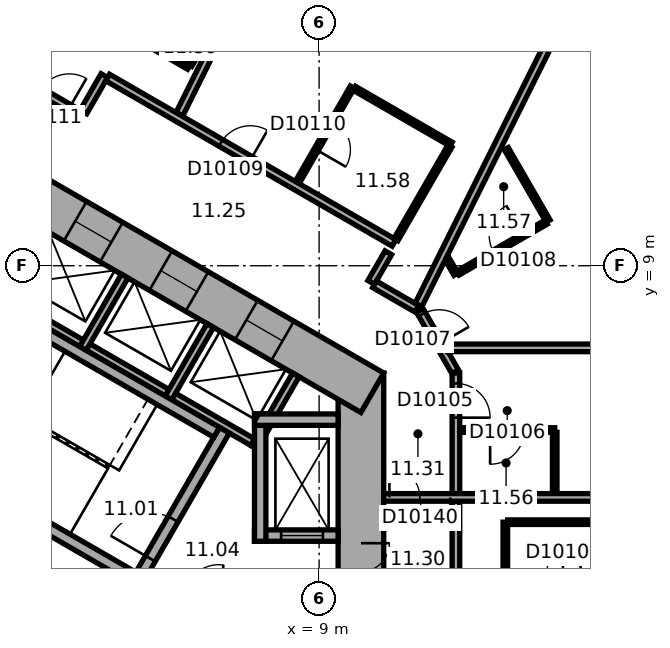
"""IFC4 building model, lengths in metres.
Left out: names, types, materials, properties, quantities, classifications, styles, units other than length and angle.
Written with IfcOpenShell. Run it as: python <this file> out.ifc"""

import sys

from ifc_helpers import new_model, si_unit, direction, frame, frame_2d, origin, place, context, subcontext, project, spatial, rectangle, extrude, element, fill, save


model = new_model("IFC4")
c1 = context("Model", 3, precision=1e-05, world=origin(), true_north=direction((0.0, 1.0)))
c2 = subcontext(c1, "Body", "Model", "MODEL_VIEW")
j1 = project(units=[si_unit("LENGTHUNIT", "METRE"), si_unit("PLANEANGLEUNIT", "RADIAN")], contexts=[c1])
p1 = place(None, origin())
s1 = spatial("IfcSite", under=j1, at=p1, CompositionType="ELEMENT")
p2 = place(p1, origin())
s2 = spatial("IfcBuilding", under=s1, at=p2, CompositionType="ELEMENT")
p3 = place(p2, frame((0.0, 0.0, 57.2)))
s3 = spatial("IfcBuildingStorey", under=s2, at=p3, CompositionType="ELEMENT", Elevation=57.2)
p4 = place(p3, frame((10.1, -6.177, 0.0), z_axis=(0.0, 0.0, 1.0), x_axis=(0.0, 1.0, 0.0)))
e1 = element("IfcWall", 1, at=p4, inside=s3, PredefinedType="SHEAR", context=c2, shape_type="SweptSolid", body=[
    extrude(rectangle(XDim=12.355, YDim=1.2, at=frame_2d((6.177, 0.0))), origin(), (0.0, 0.0, 1.0), 3.3),
])
p5 = place(p4, frame((6.378, 0.0, 0.0)))
e2 = element("IfcOpeningElement", 2, at=p5, cuts=e1, PredefinedType="OPENING", context=c2, shape_type="SweptSolid", body=[
    extrude(rectangle(XDim=1.5, YDim=2.1, at=frame_2d((0.75, 1.05))), frame((0.0, 0.61, 0.0), z_axis=(0.0, -1.0, 0.0), x_axis=(1.0, 0.0, 0.0)), (0.0, 0.0, 1.0), 1.22),
])
p6 = place(p4, frame((1.828, 0.0, 0.0)))
e3 = element("IfcOpeningElement", 3, at=p6, cuts=e1, PredefinedType="OPENING", context=c2, shape_type="SweptSolid", body=[
    extrude(rectangle(XDim=1.1, YDim=2.1, at=frame_2d((0.55, 1.05))), frame((0.0, 0.61, 0.0), z_axis=(0.0, -1.0, 0.0), x_axis=(1.0, 0.0, 0.0)), (0.0, 0.0, 1.0), 1.22),
])
p7 = place(p4, frame((4.427, 0.0, 0.0)))
e4 = element("IfcOpeningElement", 4, at=p7, cuts=e1, PredefinedType="OPENING", context=c2, shape_type="SweptSolid", body=[
    extrude(rectangle(XDim=1.1, YDim=2.1, at=frame_2d((0.55, 1.05))), frame((0.0, 0.61, 0.0), z_axis=(0.0, -1.0, 0.0), x_axis=(1.0, 0.0, 0.0)), (0.0, 0.0, 1.0), 1.22),
])
p8 = place(p3, frame((10.4, 5.658, 0.0), z_axis=(0.0, 0.0, 1.0), x_axis=(-0.866021384402, 0.500006961711, 0.0)))
e5 = element("IfcWall", 5, at=p8, inside=s3, PredefinedType="SHEAR", context=c2, shape_type="SweptSolid", body=[
    extrude(rectangle(XDim=12.355, YDim=1.2, at=frame_2d((6.178, 0.0))), origin(), (0.0, 0.0, 1.0), 3.3),
])
p9 = place(p8, frame((2.728, 0.0, 0.0)))
e6 = element("IfcOpeningElement", 6, at=p9, cuts=e5, PredefinedType="OPENING", context=c2, shape_type="SweptSolid", body=[
    extrude(rectangle(XDim=1.1, YDim=2.1, at=frame_2d((0.55, 1.05))), frame((0.0, 0.61, 0.0), z_axis=(0.0, -1.0, 0.0), x_axis=(1.0, 0.0, 0.0)), (0.0, 0.0, 1.0), 1.22),
])
p10 = place(p8, frame((5.328, 0.0, 0.0)))
e7 = element("IfcOpeningElement", 7, at=p10, cuts=e5, PredefinedType="OPENING", context=c2, shape_type="SweptSolid", body=[
    extrude(rectangle(XDim=1.1, YDim=2.1, at=frame_2d((0.55, 1.05))), frame((0.0, 0.61, 0.0), z_axis=(0.0, -1.0, 0.0), x_axis=(1.0, 0.0, 0.0)), (0.0, 0.0, 1.0), 1.22),
])
p11 = place(p8, frame((7.928, 0.0, 0.0)))
e8 = element("IfcOpeningElement", 8, at=p11, cuts=e5, PredefinedType="OPENING", context=c2, shape_type="SweptSolid", body=[
    extrude(rectangle(XDim=1.1, YDim=2.1, at=frame_2d((0.55, 1.05))), frame((0.0, 0.61, 0.0), z_axis=(0.0, -1.0, 0.0), x_axis=(1.0, 0.0, 0.0)), (0.0, 0.0, 1.0), 1.22),
])
p12 = place(p3, frame((7.424, 4.259, 0.0), z_axis=(0.0, 0.0, 1.0), x_axis=(-0.866026010844, 0.49999894854, 0.0)))
e9 = element("IfcWall", 9, at=p12, inside=s3, PredefinedType="PARTITIONING", context=c2, shape_type="SweptSolid", body=[
    extrude(rectangle(XDim=8.0, YDim=0.2, at=frame_2d((4.0, 0.0))), origin(), (0.0, 0.0, 1.0), 3.05),
])
for number, where, z_axis, x_axis in (
    (10, (7.287, 4.222, 0.0), (0.0, 0.0, 1.0), (0.5, 0.866, 0.0)),
    (11, (5.036, 5.522, 0.0), (0.0, 0.0, 1.0), (0.5, 0.866, 0.0)),
    (12, (2.784, 6.822, 0.0), (0.0, 0.0, 1.0), (0.5, 0.866, 0.0)),
):
    element("IfcWall", number, at=place(p3, frame(where, z_axis=z_axis, x_axis=x_axis)), inside=s3, PredefinedType="PARTITIONING", context=c2, shape_type="SweptSolid", body=[
        extrude(rectangle(XDim=2.2, YDim=0.2, at=frame_2d((1.1, 0.0))), origin(), (0.0, 0.0, 1.0), 3.05),
    ])
p13 = place(p3, frame((4.158, 0.602, 0.0), z_axis=(0.0, 0.0, 1.0), x_axis=(0.499977259774, 0.866038532462, 0.0)))
e13 = element("IfcWall", 13, at=p13, inside=s3, PredefinedType="SHEAR", context=c2, shape_type="SweptSolid", body=[
    extrude(rectangle(XDim=4.7, YDim=0.3, at=frame_2d((2.35, 0.0))), origin(), (0.0, 0.0, 1.0), 3.05),
])
p14 = place(p13, frame((0.8, 0.0, 0.0)))
e14 = element("IfcOpeningElement", 14, at=p14, cuts=e13, PredefinedType="OPENING", context=c2, shape_type="SweptSolid", body=[
    extrude(rectangle(XDim=1.2, YDim=2.1, at=frame_2d((0.6, 1.05))), frame((0.0, 0.16, 0.0), z_axis=(0.0, -1.0, 0.0), x_axis=(1.0, 0.0, 0.0)), (0.0, 0.0, 1.0), 0.32),
])
for number, where, z_axis, x_axis in (
    (15, (4.103, 0.807, 0.0), (0.0, 0.0, 1.0), (-0.866, 0.5, 0.0)),
    (16, (6.303, 4.617, 0.0), (0.0, 0.0, 1.0), (-0.866, 0.5, 0.0)),
):
    element("IfcWall", number, at=place(p3, frame(where, z_axis=z_axis, x_axis=x_axis)), inside=s3, PredefinedType="SHEAR", context=c2, shape_type="SweptSolid", body=[
        extrude(rectangle(XDim=7.06, YDim=0.3, at=frame_2d((3.53, 0.0))), origin(), (0.0, 0.0, 1.0), 3.05),
    ])
p15 = place(p3, frame((7.3, 1.9, 0.0), z_axis=(0.0, 0.0, 1.0), x_axis=(1.0, 0.0, 0.0)))
e17 = element("IfcWall", 17, at=p15, inside=s3, PredefinedType="SHEAR", context=c2, shape_type="SweptSolid", body=[
    extrude(rectangle(XDim=2.2, YDim=0.3, at=frame_2d((1.1, 0.0))), origin(), (0.0, 0.0, 1.0), 3.05),
])
p16 = place(p15, frame((0.7, 0.0, 0.0)))
e18 = element("IfcOpeningElement", 18, at=p16, cuts=e17, PredefinedType="OPENING", context=c2, shape_type="SweptSolid", body=[
    extrude(rectangle(XDim=1.1, YDim=2.1, at=frame_2d((0.55, 1.05))), frame((0.0, 0.16, 0.0), z_axis=(0.0, -1.0, 0.0), x_axis=(1.0, 0.0, 0.0)), (0.0, 0.0, 1.0), 0.32),
])
p17 = place(p3, frame((7.45, 1.75, 0.0), z_axis=(0.0, 0.0, 1.0), x_axis=(0.0, 1.0, 0.0)))
e19 = element("IfcWall", 19, at=p17, inside=s3, PredefinedType="SHEAR", context=c2, shape_type="SweptSolid", body=[
    extrude(rectangle(XDim=3.35, YDim=0.3, at=frame_2d((1.675, 0.0))), origin(), (0.0, 0.0, 1.0), 3.05),
])
p18 = place(p3, frame((7.3, 4.95, 0.0), z_axis=(0.0, 0.0, 1.0), x_axis=(1.0, 0.0, 0.0)))
e20 = element("IfcWall", 20, at=p18, inside=s3, PredefinedType="SHEAR", context=c2, shape_type="SweptSolid", body=[
    extrude(rectangle(XDim=2.2, YDim=0.3, at=frame_2d((1.1, 0.0))), origin(), (0.0, 0.0, 1.0), 3.05),
])
p19 = place(p3, frame((2.748, 12.962, 0.0), z_axis=(0.0, 0.0, 1.0), x_axis=(-0.866013897511, 0.50001992892, 0.0)))
e21 = element("IfcWall", 21, at=p19, inside=s3, PredefinedType="PARTITIONING", context=c2, shape_type="SweptSolid", body=[
    extrude(rectangle(XDim=2.037, YDim=0.2, at=frame_2d((1.018, 0.0))), origin(), (0.0, 0.0, 1.0), 3.05),
])
p20 = place(p19, frame((0.372, 0.0, 0.0)))
e22 = element("IfcOpeningElement", 22, at=p20, cuts=e21, PredefinedType="OPENING", context=c2, shape_type="SweptSolid", body=[
    extrude(rectangle(XDim=0.9, YDim=2.1, at=frame_2d((0.45, 1.05))), frame((0.0, 0.11, 0.0), z_axis=(0.0, -1.0, 0.0), x_axis=(1.0, 0.0, 0.0)), (0.0, 0.0, 1.0), 0.22),
])
p21 = place(p3, frame((3.349, 14.002, 0.0), z_axis=(0.0, 0.0, 1.0), x_axis=(-0.500074377092, -0.865982457891, 0.0)))
e23 = element("IfcWall", 23, at=p21, inside=s3, PredefinedType="PARTITIONING", context=c2, shape_type="SweptSolid", body=[
    extrude(rectangle(XDim=1.101, YDim=0.2, at=frame_2d((0.55, 0.0))), origin(), (0.0, 0.0, 1.0), 3.05),
])
p22 = place(p3, frame((5.351, 21.859, 0.0), z_axis=(0.0, 0.0, 1.0), x_axis=(-0.446205309328, -0.894930624086, 0.0)))
e24 = element("IfcWall", 24, at=p22, inside=s3, PredefinedType="PARTITIONING", context=c2, shape_type="SweptSolid", body=[
    extrude(rectangle(XDim=8.913, YDim=0.2, at=frame_2d((4.457, 0.0))), origin(), (0.0, 0.0, 1.0), 2.6),
])
p23 = place(p3, frame((5.569, 14.222, 0.0), z_axis=(0.0, 0.0, 1.0), x_axis=(-0.866036909293, 0.499980071345, 0.0)))
e25 = element("IfcWall", 25, at=p23, inside=s3, PredefinedType="PARTITIONING", context=c2, shape_type="SweptSolid", body=[
    extrude(rectangle(XDim=1.34, YDim=0.12, at=frame_2d((0.67, 0.0))), origin(), (0.0, 0.0, 1.0), 3.05),
])
p24 = place(p3, frame((6.839, 16.422, 0.0), z_axis=(0.0, 0.0, 1.0), x_axis=(-0.50000366821, -0.866023285932, 0.0)))
e26 = element("IfcWall", 26, at=p24, inside=s3, PredefinedType="PARTITIONING", context=c2, shape_type="SweptSolid", body=[
    extrude(rectangle(XDim=2.48, YDim=0.12, at=frame_2d((1.24, 0.0))), origin(), (0.0, 0.0, 1.0), 3.05),
])
p25 = place(p3, frame((8.424, 11.188, 0.0), z_axis=(0.0, 0.0, 1.0), x_axis=(0.49995078051, 0.866053818805, 0.0)))
e27 = element("IfcWall", 27, at=p25, inside=s3, PredefinedType="PARTITIONING", context=c2, shape_type="SweptSolid", body=[
    extrude(rectangle(XDim=2.9, YDim=0.12, at=frame_2d((1.45, 0.0))), origin(), (0.0, 0.0, 1.0), 3.05),
])
p26 = place(p25, frame((1.0, 0.0, 0.0)))
e28 = element("IfcOpeningElement", 28, at=p26, cuts=e27, PredefinedType="OPENING", context=c2, shape_type="SweptSolid", body=[
    extrude(rectangle(XDim=0.9, YDim=2.1, at=frame_2d((0.45, 1.05))), frame((0.0, 0.07, 0.0), z_axis=(0.0, -1.0, 0.0), x_axis=(1.0, 0.0, 0.0)), (0.0, 0.0, 1.0), 0.14),
])
p27 = place(p3, frame((8.872, 20.104, 0.0), z_axis=(0.0, 0.0, 1.0), x_axis=(-0.446218378653, -0.894924107706, 0.0)))
e29 = element("IfcWall", 29, at=p27, inside=s3, PredefinedType="PARTITIONING", context=c2, shape_type="SweptSolid", body=[
    extrude(rectangle(XDim=7.95, YDim=0.2, at=frame_2d((3.975, 0.0))), origin(), (0.0, 0.0, 1.0), 3.05),
])
p28 = place(p3, frame((9.926, 13.67, 0.0), z_axis=(0.0, 0.0, 1.0), x_axis=(0.866032090307, -0.499988418424, 0.0)))
e30 = element("IfcWall", 30, at=p28, inside=s3, PredefinedType="PARTITIONING", context=c2, shape_type="SweptSolid", body=[
    extrude(rectangle(XDim=2.94, YDim=0.12, at=frame_2d((1.47, 0.0))), origin(), (0.0, 0.0, 1.0), 3.05),
])
p29 = place(p3, frame((10.371, 8.561, 0.0), z_axis=(0.0, 0.0, 1.0), x_axis=(0.50004290449, 0.866000631449, 0.0)))
e31 = element("IfcWall", 31, at=p29, inside=s3, PredefinedType="PARTITIONING", context=c2, shape_type="SweptSolid", body=[
    extrude(rectangle(XDim=0.901, YDim=0.2, at=frame_2d((0.451, 0.0))), origin(), (0.0, 0.0, 1.0), 3.05),
])
p30 = place(p3, frame((10.972, 9.602, 0.0), z_axis=(0.0, 0.0, 1.0), x_axis=(-0.866033277307, 0.499986362411, 0.0)))
e32 = element("IfcWall", 32, at=p30, inside=s3, PredefinedType="PARTITIONING", context=c2, shape_type="SweptSolid", body=[
    extrude(rectangle(XDim=8.702, YDim=0.2, at=frame_2d((4.351, 0.0))), origin(), (0.0, 0.0, 1.0), 3.05),
])
p31 = place(p30, frame((4.364, 0.0, 0.0)))
e33 = element("IfcOpeningElement", 33, at=p31, cuts=e32, PredefinedType="OPENING", context=c2, shape_type="SweptSolid", body=[
    extrude(rectangle(XDim=0.9, YDim=2.1, at=frame_2d((0.45, 1.05))), frame((0.0, 0.11, 0.0), z_axis=(0.0, -1.0, 0.0), x_axis=(1.0, 0.0, 0.0)), (0.0, 0.0, 1.0), 0.22),
])
p32 = place(p3, frame((11.566, 7.871, 0.0), z_axis=(0.0, 0.0, 1.0), x_axis=(-0.866004557827, 0.500036104519, 0.0)))
e34 = element("IfcWall", 34, at=p32, inside=s3, PredefinedType="PARTITIONING", context=c2, shape_type="SweptSolid", body=[
    extrude(rectangle(XDim=1.28, YDim=0.2, at=frame_2d((0.64, 0.0))), origin(), (0.0, 0.0, 1.0), 3.05),
])
p33 = place(p3, frame((12.442, 12.148, 0.0), z_axis=(0.0, 0.0, 1.0), x_axis=(-0.49994816717, -0.866055327414, 0.0)))
e35 = element("IfcWall", 35, at=p33, inside=s3, PredefinedType="PARTITIONING", context=c2, shape_type="SweptSolid", body=[
    extrude(rectangle(XDim=2.84, YDim=0.12, at=frame_2d((1.42, 0.0))), origin(), (0.0, 0.0, 1.0), 3.05),
])
p34 = place(p3, frame((12.58, 6.212, 0.0), z_axis=(0.0, 0.0, 1.0), x_axis=(-0.500063286585, 0.865988862174, 0.0)))
e36 = element("IfcWall", 36, at=p34, inside=s3, PredefinedType="PARTITIONING", context=c2, shape_type="SweptSolid", body=[
    extrude(rectangle(XDim=1.86, YDim=0.2, at=frame_2d((0.93, 0.0))), origin(), (0.0, 0.0, 1.0), 3.05),
])
p35 = place(p34, frame((0.842, 0.0, 0.0)))
e37 = element("IfcOpeningElement", 37, at=p35, cuts=e36, PredefinedType="OPENING", context=c2, shape_type="SweptSolid", body=[
    extrude(rectangle(XDim=0.9, YDim=2.1, at=frame_2d((0.45, 1.05))), frame((0.0, 0.11, 0.0), z_axis=(0.0, -1.0, 0.0), x_axis=(1.0, 0.0, 0.0)), (0.0, 0.0, 1.0), 0.22),
])
p36 = place(p3, frame((12.6, 0.201, 0.0), z_axis=(0.0, 0.0, 1.0), x_axis=(0.0, 1.0, 0.0)))
e38 = element("IfcWall", 38, at=p36, inside=s3, PredefinedType="PARTITIONING", context=c2, shape_type="SweptSolid", body=[
    extrude(rectangle(XDim=2.604, YDim=0.2, at=frame_2d((1.302, 0.0))), origin(), (0.0, 0.0, 1.0), 3.05),
])
p37 = place(p3, frame((12.6, 3.004, 0.0), z_axis=(0.0, 0.0, 1.0), x_axis=(0.0, 1.0, 0.0)))
e39 = element("IfcWall", 39, at=p37, inside=s3, PredefinedType="PARTITIONING", context=c2, shape_type="SweptSolid", body=[
    extrude(rectangle(XDim=3.173, YDim=0.2, at=frame_2d((1.586, 0.0))), origin(), (0.0, 0.0, 1.0), 3.05),
])
p38 = place(p37, frame((1.998, 0.0, 0.0)))
e40 = element("IfcOpeningElement", 40, at=p38, cuts=e39, PredefinedType="OPENING", context=c2, shape_type="SweptSolid", body=[
    extrude(rectangle(XDim=0.9, YDim=2.1, at=frame_2d((0.45, 1.05))), frame((0.0, 0.11, 0.0), z_axis=(0.0, -1.0, 0.0), x_axis=(1.0, 0.0, 0.0)), (0.0, 0.0, 1.0), 0.22),
])
p39 = place(p3, frame((12.601, 8.776, 0.0), z_axis=(0.0, 0.0, 1.0), x_axis=(-0.500166486798, 0.865929261247, 0.0)))
e41 = element("IfcWall", 41, at=p39, inside=s3, PredefinedType="PARTITIONING", context=c2, shape_type="SweptSolid", body=[
    extrude(rectangle(XDim=0.476, YDim=0.12, at=frame_2d((0.238, 0.0))), origin(), (0.0, 0.0, 1.0), 3.05),
])
p40 = place(p3, frame((12.7, 4.677, 0.0), z_axis=(0.0, 0.0, 1.0), x_axis=(1.0, 0.0, 0.0)))
e42 = element("IfcWall", 42, at=p40, inside=s3, PredefinedType="PARTITIONING", context=c2, shape_type="SweptSolid", body=[
    extrude(rectangle(XDim=2.5, YDim=0.12, at=frame_2d((1.25, 0.0))), origin(), (0.0, 0.0, 1.0), 3.05),
])
p41 = place(p40, frame((0.8, 0.0, 0.0)))
e43 = element("IfcOpeningElement", 43, at=p41, cuts=e42, PredefinedType="OPENING", context=c2, shape_type="SweptSolid", body=[
    extrude(rectangle(XDim=0.9, YDim=2.1, at=frame_2d((0.45, 1.05))), frame((0.0, 0.07, 0.0), z_axis=(0.0, -1.0, 0.0), x_axis=(1.0, 0.0, 0.0)), (0.0, 0.0, 1.0), 0.14),
])
p42 = place(p3, frame((13.9, 0.853, 0.0), z_axis=(0.0, 0.0, 1.0), x_axis=(0.0, 1.0, 0.0)))
e44 = element("IfcWall", 44, at=p42, inside=s3, PredefinedType="PARTITIONING", context=c2, shape_type="SweptSolid", body=[
    extrude(rectangle(XDim=1.4, YDim=0.12, at=frame_2d((0.7, 0.0))), origin(), (0.0, 0.0, 1.0), 3.05),
])
p43 = place(p3, frame((13.926, 12.081, 0.0), z_axis=(0.0, 0.0, 1.0), x_axis=(0.499994660107, -0.866028486751, 0.0)))
e45 = element("IfcWall", 45, at=p43, inside=s3, PredefinedType="PARTITIONING", context=c2, shape_type="SweptSolid", body=[
    extrude(rectangle(XDim=2.2, YDim=0.12, at=frame_2d((1.1, 0.0))), origin(), (0.0, 0.0, 1.0), 3.05),
])
p44 = place(p3, frame((13.96, 2.253, 0.0), z_axis=(0.0, 0.0, 1.0), x_axis=(1.0, 0.0, 0.0)))
e46 = element("IfcWall", 46, at=p44, inside=s3, PredefinedType="PARTITIONING", context=c2, shape_type="SweptSolid", body=[
    extrude(rectangle(XDim=2.94, YDim=0.12, at=frame_2d((1.47, 0.0))), origin(), (0.0, 0.0, 1.0), 3.05),
])
p45 = place(p3, frame((14.974, 10.146, 0.0), z_axis=(0.0, 0.0, 1.0), x_axis=(-0.86599746015, -0.500048396672, 0.0)))
e47 = element("IfcWall", 47, at=p45, inside=s3, PredefinedType="PARTITIONING", context=c2, shape_type="SweptSolid", body=[
    extrude(rectangle(XDim=2.68, YDim=0.12, at=frame_2d((1.34, 0.0))), origin(), (0.0, 0.0, 1.0), 3.05),
])
p46 = place(p45, frame((0.69, 0.0, 0.0)))
e48 = element("IfcOpeningElement", 48, at=p46, cuts=e47, PredefinedType="OPENING", context=c2, shape_type="SweptSolid", body=[
    extrude(rectangle(XDim=0.9, YDim=2.1, at=frame_2d((0.45, 1.05))), frame((0.0, 0.07, 0.0), z_axis=(0.0, -1.0, 0.0), x_axis=(1.0, 0.0, 0.0)), (0.0, 0.0, 1.0), 0.14),
])
p47 = place(p3, frame((15.2, 4.618, 0.0), z_axis=(0.0, 0.0, 1.0), x_axis=(0.0, -1.0, 0.0)))
e49 = element("IfcWall", 49, at=p47, inside=s3, PredefinedType="PARTITIONING", context=c2, shape_type="SweptSolid", body=[
    extrude(rectangle(XDim=1.613, YDim=0.12, at=frame_2d((0.807, 0.0))), origin(), (0.0, 0.0, 1.0), 3.05),
])
p48 = place(p3, frame((15.915, 16.592, 0.0), z_axis=(0.0, 0.0, 1.0), x_axis=(-0.446199736347, -0.894933402709, 0.0)))
e50 = element("IfcWall", 50, at=p48, inside=s3, PredefinedType="PARTITIONING", context=c2, shape_type="SweptSolid", body=[
    extrude(rectangle(XDim=9.635, YDim=0.2, at=frame_2d((4.817, 0.0))), origin(), (0.0, 0.0, 1.0), 3.05),
])
p49 = place(p3, frame((21.95, 2.905, 0.0), z_axis=(0.0, 0.0, 1.0), x_axis=(-1.0, 0.0, 0.0)))
e51 = element("IfcWall", 51, at=p49, inside=s3, PredefinedType="PARTITIONING", context=c2, shape_type="SweptSolid", body=[
    extrude(rectangle(XDim=11.25, YDim=0.2, at=frame_2d((5.625, 0.0))), origin(), (0.0, 0.0, 1.0), 3.05),
])
p50 = place(p49, frame((9.5, 0.0, 0.0)))
e52 = element("IfcOpeningElement", 52, at=p50, cuts=e51, PredefinedType="OPENING", context=c2, shape_type="SweptSolid", body=[
    extrude(rectangle(XDim=1.6, YDim=2.1, at=frame_2d((0.8, 1.05))), frame((0.0, 0.11, 0.0), z_axis=(0.0, -1.0, 0.0), x_axis=(1.0, 0.0, 0.0)), (0.0, 0.0, 1.0), 0.22),
])
p51 = place(p3, frame((21.95, 6.839, 0.0), z_axis=(0.0, 0.0, 1.0), x_axis=(-1.0, 0.0, 0.0)))
e53 = element("IfcWall", 53, at=p51, inside=s3, PredefinedType="PARTITIONING", context=c2, shape_type="SweptSolid", body=[
    extrude(rectangle(XDim=9.572, YDim=0.2, at=frame_2d((4.786, 0.0))), origin(), (0.0, 0.0, 1.0), 3.05),
])
p52 = place(p5, origin())
e54 = element("IfcDoor", 54, at=p52, inside=s3, OperationType="DOUBLE_DOOR_SINGLE_SWING", PredefinedType="DOOR", context=c2, shape_type="SweptSolid", body=[
    extrude(rectangle(XDim=1.5, YDim=2.1, at=frame_2d((0.75, 1.05))), frame((0.0, 0.025, 0.0), z_axis=(0.0, -1.0, 0.0), x_axis=(1.0, 0.0, 0.0)), (0.0, 0.0, 1.0), 0.05),
])
fill(e2, e54)
p53 = place(p14, origin())
e55 = element("IfcDoor", 55, at=p53, inside=s3, OperationType="SINGLE_SWING_RIGHT", PredefinedType="DOOR", context=c2, shape_type="SweptSolid", body=[
    extrude(rectangle(XDim=1.2, YDim=2.1, at=frame_2d((0.6, 1.05))), frame((0.0, 0.025, 0.0), z_axis=(0.0, -1.0, 0.0), x_axis=(1.0, 0.0, 0.0)), (0.0, 0.0, 1.0), 0.05),
])
fill(e14, e55)
p54 = place(p16, origin())
e56 = element("IfcDoor", 56, at=p54, inside=s3, OperationType="DOUBLE_DOOR_SLIDING", PredefinedType="DOOR", context=c2, shape_type="SweptSolid", body=[
    extrude(rectangle(XDim=1.1, YDim=2.1, at=frame_2d((0.55, 1.05))), frame((0.0, 0.025, 0.0), z_axis=(0.0, -1.0, 0.0), x_axis=(1.0, 0.0, 0.0)), (0.0, 0.0, 1.0), 0.05),
])
fill(e18, e56)
p55 = place(p9, origin())
e57 = element("IfcDoor", 57, at=p55, inside=s3, OperationType="DOUBLE_DOOR_SLIDING", PredefinedType="DOOR", context=c2, shape_type="SweptSolid", body=[
    extrude(rectangle(XDim=1.1, YDim=2.1, at=frame_2d((0.55, 1.05))), frame((0.0, 0.025, 0.0), z_axis=(0.0, -1.0, 0.0), x_axis=(1.0, 0.0, 0.0)), (0.0, 0.0, 1.0), 0.05),
])
fill(e6, e57)
p56 = place(p10, origin())
e58 = element("IfcDoor", 58, at=p56, inside=s3, OperationType="DOUBLE_DOOR_SLIDING", PredefinedType="DOOR", context=c2, shape_type="SweptSolid", body=[
    extrude(rectangle(XDim=1.1, YDim=2.1, at=frame_2d((0.55, 1.05))), frame((0.0, 0.025, 0.0), z_axis=(0.0, -1.0, 0.0), x_axis=(1.0, 0.0, 0.0)), (0.0, 0.0, 1.0), 0.05),
])
fill(e7, e58)
p57 = place(p11, origin())
e59 = element("IfcDoor", 59, at=p57, inside=s3, OperationType="DOUBLE_DOOR_SLIDING", PredefinedType="DOOR", context=c2, shape_type="SweptSolid", body=[
    extrude(rectangle(XDim=1.1, YDim=2.1, at=frame_2d((0.55, 1.05))), frame((0.0, 0.025, 0.0), z_axis=(0.0, -1.0, 0.0), x_axis=(1.0, 0.0, 0.0)), (0.0, 0.0, 1.0), 0.05),
])
fill(e8, e59)
p58 = place(p38, origin())
e60 = element("IfcDoor", 60, at=p58, inside=s3, OperationType="SINGLE_SWING_LEFT", PredefinedType="DOOR", context=c2, shape_type="SweptSolid", body=[
    extrude(rectangle(XDim=0.9, YDim=2.1, at=frame_2d((0.45, 1.05))), frame((0.0, 0.025, 0.0), z_axis=(0.0, -1.0, 0.0), x_axis=(1.0, 0.0, 0.0)), (0.0, 0.0, 1.0), 0.05),
])
fill(e40, e60)
p59 = place(p41, origin())
e61 = element("IfcDoor", 61, at=p59, inside=s3, OperationType="SINGLE_SWING_LEFT", PredefinedType="DOOR", context=c2, shape_type="SweptSolid", body=[
    extrude(rectangle(XDim=0.9, YDim=2.1, at=frame_2d((0.45, 1.05))), frame((0.0, 0.025, 0.0), z_axis=(0.0, -1.0, 0.0), x_axis=(1.0, 0.0, 0.0)), (0.0, 0.0, 1.0), 0.05),
])
fill(e43, e61)
p60 = place(p35, origin())
e62 = element("IfcDoor", 62, at=p60, inside=s3, OperationType="SINGLE_SWING_LEFT", PredefinedType="DOOR", context=c2, shape_type="SweptSolid", body=[
    extrude(rectangle(XDim=0.9, YDim=2.1, at=frame_2d((0.45, 1.05))), frame((0.0, 0.025, 0.0), z_axis=(0.0, -1.0, 0.0), x_axis=(1.0, 0.0, 0.0)), (0.0, 0.0, 1.0), 0.05),
])
fill(e37, e62)
p61 = place(p46, origin())
e63 = element("IfcDoor", 63, at=p61, inside=s3, OperationType="SINGLE_SWING_LEFT", PredefinedType="DOOR", context=c2, shape_type="SweptSolid", body=[
    extrude(rectangle(XDim=0.9, YDim=2.1, at=frame_2d((0.45, 1.05))), frame((0.0, 0.025, 0.0), z_axis=(0.0, -1.0, 0.0), x_axis=(1.0, 0.0, 0.0)), (0.0, 0.0, 1.0), 0.05),
])
fill(e48, e63)
p62 = place(p31, origin())
e64 = element("IfcDoor", 64, at=p62, inside=s3, OperationType="SINGLE_SWING_LEFT", PredefinedType="DOOR", context=c2, shape_type="SweptSolid", body=[
    extrude(rectangle(XDim=0.9, YDim=2.1, at=frame_2d((0.45, 1.05))), frame((0.0, 0.025, 0.0), z_axis=(0.0, -1.0, 0.0), x_axis=(1.0, 0.0, 0.0)), (0.0, 0.0, 1.0), 0.05),
])
fill(e33, e64)
p63 = place(p26, origin())
e65 = element("IfcDoor", 65, at=p63, inside=s3, OperationType="SINGLE_SWING_LEFT", PredefinedType="DOOR", context=c2, shape_type="SweptSolid", body=[
    extrude(rectangle(XDim=0.9, YDim=2.1, at=frame_2d((0.45, 1.05))), frame((0.0, 0.025, 0.0), z_axis=(0.0, -1.0, 0.0), x_axis=(1.0, 0.0, 0.0)), (0.0, 0.0, 1.0), 0.05),
])
fill(e28, e65)
p64 = place(p20, origin())
e66 = element("IfcDoor", 66, at=p64, inside=s3, OperationType="SINGLE_SWING_LEFT", PredefinedType="DOOR", context=c2, shape_type="SweptSolid", body=[
    extrude(rectangle(XDim=0.9, YDim=2.1, at=frame_2d((0.45, 1.05))), frame((0.0, 0.025, 0.0), z_axis=(0.0, -1.0, 0.0), x_axis=(1.0, 0.0, 0.0)), (0.0, 0.0, 1.0), 0.05),
])
fill(e22, e66)
p65 = place(p50, origin())
e67 = element("IfcDoor", 67, at=p65, inside=s3, OperationType="DOUBLE_DOOR_SINGLE_SWING", PredefinedType="DOOR", context=c2, shape_type="SweptSolid", body=[
    extrude(rectangle(XDim=1.6, YDim=2.1, at=frame_2d((0.8, 1.05))), frame((0.0, 0.025, 0.0), z_axis=(0.0, -1.0, 0.0), x_axis=(1.0, 0.0, 0.0)), (0.0, 0.0, 1.0), 0.05),
])
fill(e52, e67)
save(model, sys.argv[1])
